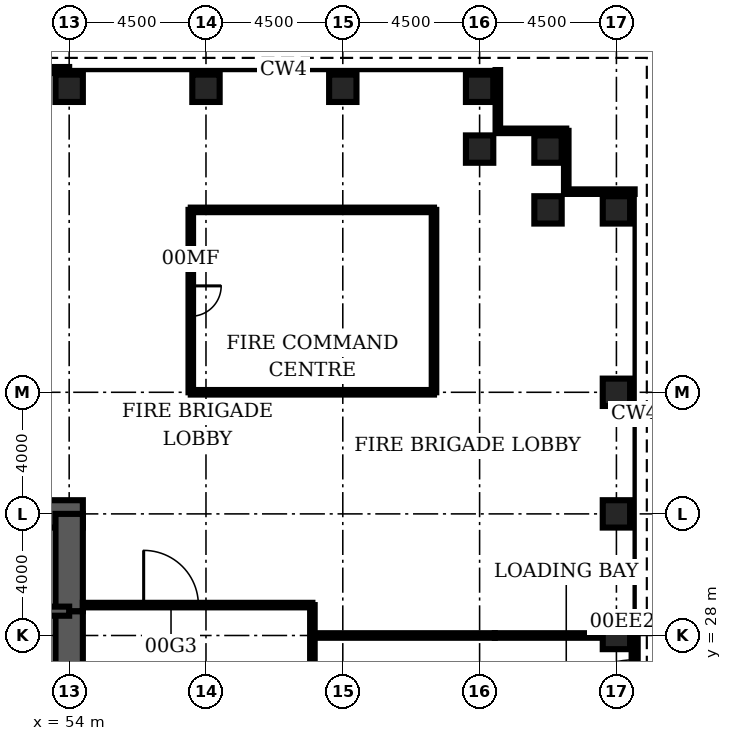
"""IFC4 building model, lengths in metres.
Left out: names, types, materials, properties, quantities, classifications, styles, units other than length and angle.
Written with IfcOpenShell. Run it as: python <this file> out.ifc"""

import sys

from ifc_helpers import new_model, si_unit, direction, frame, frame_2d, origin, origin_2d, place, context, subcontext, project, spatial, rectangle, hollow_rectangle, extrude, element, fill, save


model = new_model("IFC4")
c1 = context("Model", 3, precision=1e-05, world=origin(), true_north=direction((0.0, 1.0)))
c2 = subcontext(c1, "Body", "Model", "MODEL_VIEW")
j1 = project(units=[si_unit("LENGTHUNIT", "METRE"), si_unit("PLANEANGLEUNIT", "RADIAN")], contexts=[c1])
p1 = place(None, origin())
s1 = spatial("IfcSite", under=j1, at=p1, CompositionType="ELEMENT")
p2 = place(p1, origin())
s2 = spatial("IfcBuilding", under=s1, at=p2, CompositionType="ELEMENT")
p3 = place(p2, origin())
s3 = spatial("IfcBuildingStorey", under=s2, at=p3, CompositionType="ELEMENT", Elevation=0.0)
for number, where, z_axis, x_axis in (
    (1, (72.0, 28.0, 0.0), (0.0, 0.0, 1.0), (1.0, 0.0, 0.0)),
    (2, (72.0, 32.0, 0.0), (0.0, 0.0, 1.0), (1.0, 0.0, 0.0)),
    (3, (72.0, 36.0, 0.0), (0.0, 0.0, 1.0), (1.0, 0.0, 0.0)),
    (4, (72.0, 42.0, 0.0), (0.0, 0.0, 1.0), (1.0, 0.0, 0.0)),
    (5, (69.75, 42.0, 0.0), (0.0, 0.0, 1.0), (1.0, 0.0, 0.0)),
    (6, (69.75, 44.0, 0.0), (0.0, 0.0, 1.0), (1.0, 0.0, 0.0)),
    (7, (67.5, 44.0, 0.0), (0.0, 0.0, 1.0), (0.0, 1.0, 0.0)),
    (8, (67.5, 46.0, 0.0), (0.0, 0.0, 1.0), (0.0, 1.0, 0.0)),
    (9, (63.0, 46.0, 0.0), (0.0, 0.0, 1.0), (0.0, 1.0, 0.0)),
    (10, (58.5, 46.0, 0.0), (0.0, 0.0, 1.0), (0.0, 1.0, 0.0)),
    (11, (54.0, 46.0, 0.0), (0.0, 0.0, 1.0), (0.0, 1.0, 0.0)),
):
    element("IfcColumn", number, at=place(p3, frame(where, z_axis=z_axis, x_axis=x_axis)), inside=s3, PredefinedType="COLUMN", context=c2, shape_type="SweptSolid", body=[
        extrude(hollow_rectangle(XDim=0.9, YDim=0.9, WallThickness=0.12, at=origin_2d()), origin(), (0.0, 0.0, 1.0), 6.0),
    ])
p4 = place(p3, frame((54.45, 32.0, 0.0), z_axis=(0.0, 0.0, 1.0), x_axis=(-1.0, 0.0, 0.0)))
e12 = element("IfcWall", 12, at=p4, inside=s3, PredefinedType="SHEAR", context=c2, shape_type="SweptSolid", body=[
    extrude(rectangle(XDim=9.45, YDim=0.9, at=frame_2d((4.725, 0.0))), origin(), (0.0, 0.0, 1.0), 6.0),
])
p5 = place(p3, frame((54.0, 26.0, 0.0), z_axis=(0.0, 0.0, 1.0), x_axis=(0.0, 1.0, 0.0)))
e13 = element("IfcWall", 13, at=p5, inside=s3, PredefinedType="SHEAR", context=c2, shape_type="SweptSolid", body=[
    extrude(rectangle(XDim=2.8, YDim=0.9, at=frame_2d((1.4, 0.0))), origin(), (0.0, 0.0, 1.0), 6.0),
])
p6 = place(p5, frame((0.6, 0.0, 0.0)))
e14 = element("IfcOpeningElement", 14, at=p6, cuts=e13, PredefinedType="OPENING", context=c2, shape_type="SweptSolid", body=[
    extrude(rectangle(XDim=1.8, YDim=2.1, at=frame_2d((0.9, 1.05))), frame((0.0, 0.46, 0.0), z_axis=(0.0, -1.0, 0.0), x_axis=(1.0, 0.0, 0.0)), (0.0, 0.0, 1.0), 0.92),
])
p7 = place(p3, frame((54.0, 28.8, 0.0), z_axis=(0.0, 0.0, 1.0), x_axis=(0.0, 1.0, 0.0)))
e15 = element("IfcWall", 15, at=p7, inside=s3, PredefinedType="SHEAR", context=c2, shape_type="SweptSolid", body=[
    extrude(rectangle(XDim=3.2, YDim=0.9, at=frame_2d((1.6, 0.0))), origin(), (0.0, 0.0, 1.0), 6.0),
])
p8 = place(p3, frame((45.0, 28.8, 0.0), z_axis=(0.0, 0.0, 1.0), x_axis=(1.0, 0.0, 0.0)))
e16 = element("IfcWall", 16, at=p8, inside=s3, PredefinedType="SOLIDWALL", context=c2, shape_type="SweptSolid", body=[
    extrude(rectangle(XDim=9.0, YDim=0.3, at=frame_2d((4.5, 0.0))), origin(), (0.0, 0.0, 1.0), 6.0),
])
p9 = place(p8, frame((7.35, 0.0, 0.0)))
e17 = element("IfcOpeningElement", 17, at=p9, cuts=e16, PredefinedType="OPENING", context=c2, shape_type="SweptSolid", body=[
    extrude(rectangle(XDim=1.0, YDim=2.1, at=frame_2d((0.5, 1.05))), frame((0.0, 0.16, 0.0), z_axis=(0.0, -1.0, 0.0), x_axis=(1.0, 0.0, 0.0)), (0.0, 0.0, 1.0), 0.32),
])
for number, where, z_axis, x_axis in (
    (18, (58.0, 36.0, 0.0), (0.0, 0.0, 1.0), (1.0, 0.0, 0.0)),
    (19, (66.0, 42.0, 0.0), (0.0, 0.0, 1.0), (-1.0, 0.0, 0.0)),
):
    element("IfcWall", number, at=place(p3, frame(where, z_axis=z_axis, x_axis=x_axis)), inside=s3, PredefinedType="PARTITIONING", context=c2, shape_type="SweptSolid", body=[
        extrude(rectangle(XDim=8.0, YDim=0.15, at=frame_2d((4.0, 0.0))), origin(), (0.0, 0.0, 1.0), 3.0),
    ])
p10 = place(p3, frame((58.0, 42.0, 0.0), z_axis=(0.0, 0.0, 1.0), x_axis=(0.0, -1.0, 0.0)))
e20 = element("IfcWall", 20, at=p10, inside=s3, PredefinedType="PARTITIONING", context=c2, shape_type="SweptSolid", body=[
    extrude(rectangle(XDim=6.0, YDim=0.15, at=frame_2d((3.0, 0.0))), origin(), (0.0, 0.0, 1.0), 3.0),
])
p11 = place(p10, frame((2.5, 0.0, 0.0)))
e21 = element("IfcOpeningElement", 21, at=p11, cuts=e20, PredefinedType="OPENING", context=c2, shape_type="SweptSolid", body=[
    extrude(rectangle(XDim=1.0, YDim=2.1, at=frame_2d((0.5, 1.05))), frame((0.0, 0.085, 0.0), z_axis=(0.0, -1.0, 0.0), x_axis=(1.0, 0.0, 0.0)), (0.0, 0.0, 1.0), 0.17),
])
p12 = place(p3, frame((66.0, 36.0, 0.0), z_axis=(0.0, 0.0, 1.0), x_axis=(0.0, 1.0, 0.0)))
e22 = element("IfcWall", 22, at=p12, inside=s3, PredefinedType="PARTITIONING", context=c2, shape_type="SweptSolid", body=[
    extrude(rectangle(XDim=6.0, YDim=0.15, at=frame_2d((3.0, 0.0))), origin(), (0.0, 0.0, 1.0), 3.0),
])
p13 = place(p3, frame((68.0, 28.0, 0.0), z_axis=(0.0, 0.0, 1.0), x_axis=(1.0, 0.0, 0.0)))
e23 = element("IfcWall", 23, at=p13, inside=s3, PredefinedType="PARTITIONING", context=c2, shape_type="SweptSolid", body=[
    extrude(rectangle(XDim=4.5, YDim=0.15, at=frame_2d((2.25, 0.0))), origin(), (0.0, 0.0, 1.0), 3.0),
])
p14 = place(p3, frame((62.0, 23.0, 0.0), z_axis=(0.0, 0.0, 1.0), x_axis=(0.0, 1.0, 0.0)))
e24 = element("IfcWall", 24, at=p14, inside=s3, PredefinedType="PARTITIONING", context=c2, shape_type="SweptSolid", body=[
    extrude(rectangle(XDim=6.0, YDim=0.15, at=frame_2d((3.0, 0.0))), origin(), (0.0, 0.0, 1.0), 3.0),
])
p15 = place(p14, frame((2.5, 0.0, 0.0)))
e25 = element("IfcOpeningElement", 25, at=p15, cuts=e24, PredefinedType="OPENING", context=c2, shape_type="SweptSolid", body=[
    extrude(rectangle(XDim=1.6, YDim=2.1, at=frame_2d((0.8, 1.05))), frame((0.0, 0.085, 0.0), z_axis=(0.0, -1.0, 0.0), x_axis=(1.0, 0.0, 0.0)), (0.0, 0.0, 1.0), 0.17),
])
p16 = place(p3, frame((62.0, 28.0, 0.0), z_axis=(0.0, 0.0, 1.0), x_axis=(1.0, 0.0, 0.0)))
e26 = element("IfcWall", 26, at=p16, inside=s3, PredefinedType="PARTITIONING", context=c2, shape_type="SweptSolid", body=[
    extrude(rectangle(XDim=6.0, YDim=0.15, at=frame_2d((3.0, 0.0))), origin(), (0.0, 0.0, 1.0), 3.0),
])
p17 = place(p3, frame((54.45, 29.0, 0.0), z_axis=(0.0, 0.0, 1.0), x_axis=(1.0, 0.0, 0.0)))
e27 = element("IfcWall", 27, at=p17, inside=s3, PredefinedType="PARTITIONING", context=c2, shape_type="SweptSolid", body=[
    extrude(rectangle(XDim=7.55, YDim=0.15, at=frame_2d((3.775, 0.0))), origin(), (0.0, 0.0, 1.0), 3.0),
])
p18 = place(p17, frame((2.0, 0.0, 0.0)))
e28 = element("IfcOpeningElement", 28, at=p18, cuts=e27, PredefinedType="OPENING", context=c2, shape_type="SweptSolid", body=[
    extrude(rectangle(XDim=1.8, YDim=2.1, at=frame_2d((0.9, 1.05))), frame((0.0, 0.085, 0.0), z_axis=(0.0, -1.0, 0.0), x_axis=(1.0, 0.0, 0.0)), (0.0, 0.0, 1.0), 0.17),
])
p19 = place(p3, frame((72.6, 20.0, 0.0), z_axis=(0.0, 0.0, 1.0), x_axis=(0.0, 1.0, 0.0)))
e29 = element("IfcWall", 29, at=p19, inside=s3, PredefinedType="USERDEFINED", context=c2, shape_type="SweptSolid", body=[
    extrude(rectangle(XDim=8.0, YDim=0.2, at=frame_2d((4.0, 0.0))), origin(), (0.0, 0.0, 1.0), 5.82),
])
p20 = place(p19, frame((0.8, 0.0, 0.0)))
e30 = element("IfcOpeningElement", 30, at=p20, cuts=e29, PredefinedType="OPENING", context=c2, shape_type="SweptSolid", body=[
    extrude(rectangle(XDim=1.8, YDim=2.4, at=frame_2d((0.9, 1.2))), frame((0.0, 0.11, 0.0), z_axis=(0.0, -1.0, 0.0), x_axis=(1.0, 0.0, 0.0)), (0.0, 0.0, 1.0), 0.22),
])
p21 = place(p19, frame((4.2, 0.0, 0.0)))
e31 = element("IfcOpeningElement", 31, at=p21, cuts=e29, PredefinedType="OPENING", context=c2, shape_type="SweptSolid", body=[
    extrude(rectangle(XDim=3.0, YDim=3.5, at=frame_2d((1.5, 1.75))), frame((0.0, 0.11, 0.0), z_axis=(0.0, -1.0, 0.0), x_axis=(1.0, 0.0, 0.0)), (0.0, 0.0, 1.0), 0.22),
])
p22 = place(p3, frame((72.6, 42.6, 0.0), z_axis=(0.0, 0.0, 1.0), x_axis=(-1.0, 0.0, 0.0)))
e32 = element("IfcWall", 32, at=p22, inside=s3, PredefinedType="ELEMENTEDWALL", context=c2, shape_type="SweptSolid", body=[
    extrude(rectangle(XDim=2.25, YDim=0.15, at=frame_2d((1.125, 0.0))), origin(), (0.0, 0.0, 1.0), 5.82),
])
p23 = place(p3, frame((70.35, 42.6, 0.0), z_axis=(0.0, 0.0, 1.0), x_axis=(0.0, 1.0, 0.0)))
e33 = element("IfcWall", 33, at=p23, inside=s3, PredefinedType="ELEMENTEDWALL", context=c2, shape_type="SweptSolid", body=[
    extrude(rectangle(XDim=2.0, YDim=0.15, at=frame_2d((1.0, 0.0))), origin(), (0.0, 0.0, 1.0), 5.82),
])
p24 = place(p3, frame((70.35, 44.6, 0.0), z_axis=(0.0, 0.0, 1.0), x_axis=(-1.0, 0.0, 0.0)))
e34 = element("IfcWall", 34, at=p24, inside=s3, PredefinedType="ELEMENTEDWALL", context=c2, shape_type="SweptSolid", body=[
    extrude(rectangle(XDim=2.25, YDim=0.15, at=frame_2d((1.125, 0.0))), origin(), (0.0, 0.0, 1.0), 5.82),
])
p25 = place(p3, frame((68.1, 44.6, 0.0), z_axis=(0.0, 0.0, 1.0), x_axis=(0.0, 1.0, 0.0)))
e35 = element("IfcWall", 35, at=p25, inside=s3, PredefinedType="ELEMENTEDWALL", context=c2, shape_type="SweptSolid", body=[
    extrude(rectangle(XDim=2.0, YDim=0.15, at=frame_2d((1.0, 0.0))), origin(), (0.0, 0.0, 1.0), 5.82),
])
p26 = place(p3, frame((54.0, 46.6, 0.0), z_axis=(0.0, 0.0, 1.0), x_axis=(-1.0, 0.0, 0.0)))
e36 = element("IfcWall", 36, at=p26, inside=s3, PredefinedType="USERDEFINED", context=c2, shape_type="SweptSolid", body=[
    extrude(rectangle(XDim=9.0, YDim=0.2, at=frame_2d((4.5, 0.0))), origin(), (0.0, 0.0, 1.0), 5.82),
])
p27 = place(p26, frame((1.4, 0.0, 0.0)))
e37 = element("IfcOpeningElement", 37, at=p27, cuts=e36, PredefinedType="OPENING", context=c2, shape_type="SweptSolid", body=[
    extrude(rectangle(XDim=1.8, YDim=2.4, at=frame_2d((0.9, 1.2))), frame((0.0, 0.11, 0.0), z_axis=(0.0, -1.0, 0.0), x_axis=(1.0, 0.0, 0.0)), (0.0, 0.0, 1.0), 0.22),
])
p28 = place(p26, frame((5.8, 0.0, 0.0)))
e38 = element("IfcOpeningElement", 38, at=p28, cuts=e36, PredefinedType="OPENING", context=c2, shape_type="SweptSolid", body=[
    extrude(rectangle(XDim=1.8, YDim=2.4, at=frame_2d((0.9, 1.2))), frame((0.0, 0.11, 0.0), z_axis=(0.0, -1.0, 0.0), x_axis=(1.0, 0.0, 0.0)), (0.0, 0.0, 1.0), 0.22),
])
p29 = place(p11, origin())
e39 = element("IfcDoor", 39, at=p29, inside=s3, OperationType="SINGLE_SWING_LEFT", PredefinedType="DOOR", context=c2, shape_type="SweptSolid", body=[
    extrude(rectangle(XDim=1.0, YDim=2.1, at=frame_2d((0.5, 1.05))), frame((0.0, 0.025, 0.0), z_axis=(0.0, -1.0, 0.0), x_axis=(1.0, 0.0, 0.0)), (0.0, 0.0, 1.0), 0.05),
])
fill(e21, e39)
p30 = place(p18, origin())
e40 = element("IfcDoor", 40, at=p30, inside=s3, OperationType="SINGLE_SWING_LEFT", PredefinedType="DOOR", context=c2, shape_type="SweptSolid", body=[
    extrude(rectangle(XDim=1.8, YDim=2.1, at=frame_2d((0.9, 1.05))), frame((0.0, 0.025, 0.0), z_axis=(0.0, -1.0, 0.0), x_axis=(1.0, 0.0, 0.0)), (0.0, 0.0, 1.0), 0.05),
])
fill(e28, e40)
p31 = place(p21, origin())
e41 = element("IfcDoor", 41, at=p31, inside=s3, OperationType="SINGLE_SWING_LEFT", PredefinedType="USERDEFINED", context=c2, shape_type="SweptSolid", body=[
    extrude(rectangle(XDim=3.0, YDim=3.5, at=frame_2d((1.5, 1.75))), frame((0.0, 0.025, 0.0), z_axis=(0.0, -1.0, 0.0), x_axis=(1.0, 0.0, 0.0)), (0.0, 0.0, 1.0), 0.05),
])
fill(e31, e41)
p32 = place(p6, origin())
e42 = element("IfcDoor", 42, at=p32, inside=s3, OperationType="SINGLE_SWING_LEFT", PredefinedType="DOOR", context=c2, shape_type="SweptSolid", body=[
    extrude(rectangle(XDim=1.8, YDim=2.1, at=frame_2d((0.9, 1.05))), frame((0.0, 0.45, 0.0), z_axis=(0.0, -1.0, 0.0), x_axis=(1.0, 0.0, 0.0)), (0.0, 0.0, 1.0), 0.899),
])
fill(e14, e42)
save(model, sys.argv[1])
